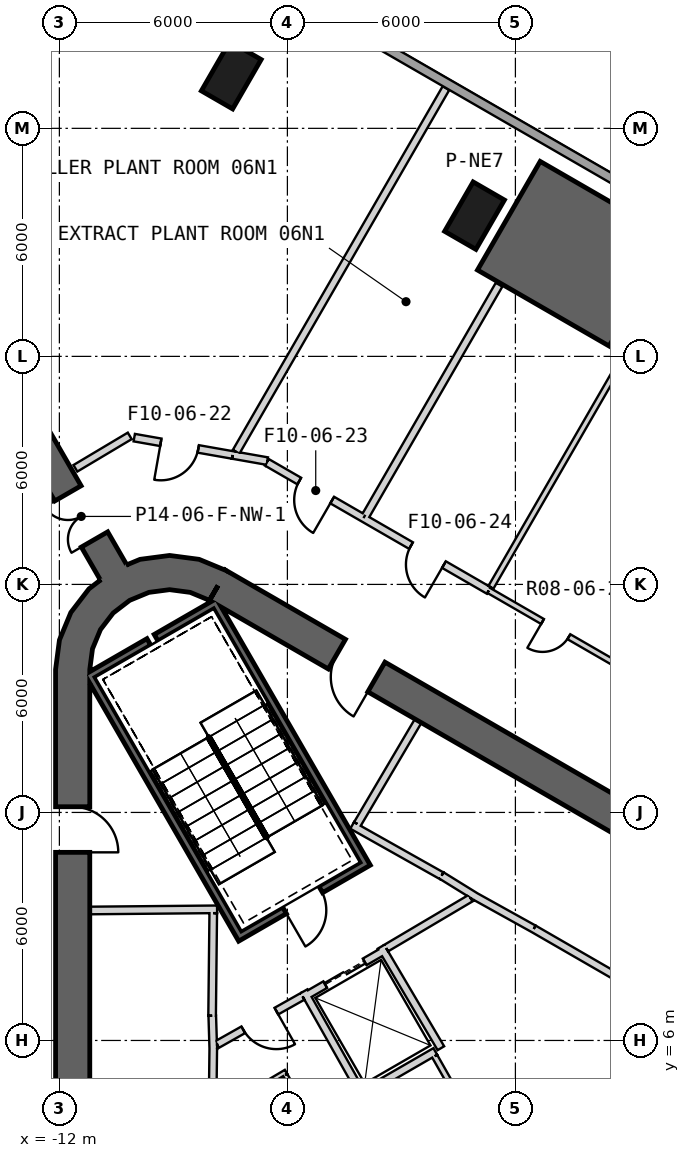
"""IFC4 building model, lengths in metres.
Left out: names, types, materials, properties, quantities, classifications, styles, units other than length and angle.
Written with IfcOpenShell. Run it as: python <this file> out.ifc"""

import sys

from ifc_helpers import new_model, si_unit, direction, frame, frame_2d, origin, origin_2d, place, context, subcontext, project, spatial, polyline, rectangle, outline, extrude, element, fill, save


model = new_model("IFC4")
c1 = context("Model", 3, precision=1e-05, world=origin(), true_north=direction((0.0, 1.0)))
c2 = subcontext(c1, "Body", "Model", "MODEL_VIEW")
j1 = project(units=[si_unit("LENGTHUNIT", "METRE"), si_unit("PLANEANGLEUNIT", "RADIAN")], contexts=[c1])
p1 = place(None, origin())
s1 = spatial("IfcSite", under=j1, at=p1, CompositionType="ELEMENT")
p2 = place(p1, origin())
s2 = spatial("IfcBuilding", under=s1, at=p2, CompositionType="ELEMENT")
p3 = place(p2, frame((0.0, 0.0, 39.5)))
s3 = spatial("IfcBuildingStorey", under=s2, at=p3, CompositionType="ELEMENT", Elevation=39.5)
for number, where, z_axis, x_axis in (
    (1, (-1.076, 27.703, 0.0), (0.0, 0.0, 1.0), (0.5, 0.866, 0.0)),
    (2, (-7.477, 31.398, 0.0), (0.0, 0.0, 1.0), (0.5, 0.866, 0.0)),
):
    element("IfcColumn", number, at=place(p3, frame(where, z_axis=z_axis, x_axis=x_axis)), inside=s3, PredefinedType="COLUMN", context=c2, shape_type="SweptSolid", body=[
        extrude(rectangle(XDim=1.5, YDim=0.95, at=origin_2d()), origin(), (0.0, 0.0, 1.0), 5.7),
    ])
p4 = place(p3, frame((19.475, 2.208, 0.0), z_axis=(0.0, 0.0, 1.0), x_axis=(-0.866028369851, 0.499994862586, 0.0)))
e3 = element("IfcWall", 3, at=p4, inside=s3, PredefinedType="SHEAR", context=c2, shape_type="SweptSolid", body=[
    extrude(rectangle(XDim=31.523, YDim=0.9, at=frame_2d((15.762, 0.0))), origin(), (0.0, 0.0, 1.0), 6.0),
])
p5 = place(p4, frame((3.612, 0.0, 0.0)))
e4 = element("IfcOpeningElement", 4, at=p5, cuts=e3, PredefinedType="OPENING", context=c2, shape_type="SweptSolid", body=[
    extrude(rectangle(XDim=1.2, YDim=2.4, at=frame_2d((0.6, 1.2))), frame((0.0, 0.46, 0.0), z_axis=(0.0, -1.0, 0.0), x_axis=(1.0, 0.0, 0.0)), (0.0, 0.0, 1.0), 0.92),
])
p6 = place(p4, frame((26.712, 0.0, 0.0)))
e5 = element("IfcOpeningElement", 5, at=p6, cuts=e3, PredefinedType="OPENING", context=c2, shape_type="SweptSolid", body=[
    extrude(rectangle(XDim=1.2, YDim=2.4, at=frame_2d((0.6, 1.2))), frame((0.0, 0.46, 0.0), z_axis=(0.0, -1.0, 0.0), x_axis=(1.0, 0.0, 0.0)), (0.0, 0.0, 1.0), 0.92),
])
p7 = place(p3, frame((-11.65, 15.762, 0.0), z_axis=(0.0, 0.0, 1.0), x_axis=(0.0, -1.0, 0.0)))
e6 = element("IfcWall", 6, at=p7, inside=s3, PredefinedType="SHEAR", context=c2, shape_type="SweptSolid", body=[
    extrude(rectangle(XDim=31.523, YDim=0.9, at=frame_2d((15.762, 0.0))), origin(), (0.0, 0.0, 1.0), 6.0),
])
p8 = place(p7, frame((3.612, 0.0, 0.0)))
e7 = element("IfcOpeningElement", 7, at=p8, cuts=e6, PredefinedType="OPENING", context=c2, shape_type="SweptSolid", body=[
    extrude(rectangle(XDim=1.2, YDim=2.4, at=frame_2d((0.6, 1.2))), frame((0.0, 0.46, 0.0), z_axis=(0.0, -1.0, 0.0), x_axis=(1.0, 0.0, 0.0)), (0.0, 0.0, 1.0), 0.92),
])
p9 = place(p7, frame((26.712, 0.0, 0.0)))
e8 = element("IfcOpeningElement", 8, at=p9, cuts=e6, PredefinedType="OPENING", context=c2, shape_type="SweptSolid", body=[
    extrude(rectangle(XDim=1.2, YDim=2.4, at=frame_2d((0.6, 1.2))), frame((0.0, 0.46, 0.0), z_axis=(0.0, -1.0, 0.0), x_axis=(1.0, 0.0, 0.0)), (0.0, 0.0, 1.0), 0.92),
])
p10 = place(p3, origin())
e9 = element("IfcWall", 9, at=p10, inside=s3, PredefinedType="SHEAR", context=c2, shape_type="SweptSolid", body=[
    extrude(outline(polyline([(-7.6, 18.36), (-8.323, 18.659), (-9.1, 18.762), (-9.876, 18.659), (-10.6, 18.36), (-11.221, 17.883), (-11.698, 17.262), (-11.998, 16.538), (-12.1, 15.762), (-11.2, 15.762), (-11.128, 16.305), (-10.919, 16.812), (-10.585, 17.247), (-10.15, 17.58), (-9.644, 17.79), (-9.1, 17.862), (-8.556, 17.79), (-8.05, 17.58), (-7.6, 18.36)])), origin(), (0.0, 0.0, 1.0), 6.0),
])
p11 = place(p3, frame((-10.575, 18.316, 0.0), z_axis=(0.0, 0.0, 1.0), x_axis=(-0.499996575515, 0.866027380903, 0.0)))
e10 = element("IfcWall", 10, at=p11, inside=s3, PredefinedType="SHEAR", context=c2, shape_type="SweptSolid", body=[
    extrude(rectangle(XDim=13.954, YDim=0.8, at=frame_2d((6.977, 0.0))), origin(), (0.0, 0.0, 1.0), 6.0),
])
p12 = place(p11, frame((1.0, 0.0, 0.0)))
e11 = element("IfcOpeningElement", 11, at=p12, cuts=e10, PredefinedType="OPENING", context=c2, shape_type="SweptSolid", body=[
    extrude(rectangle(XDim=1.4, YDim=2.4, at=frame_2d((0.7, 1.2))), frame((0.0, 0.41, 0.0), z_axis=(0.0, -1.0, 0.0), x_axis=(1.0, 0.0, 0.0)), (0.0, 0.0, 1.0), 0.82),
])
p13 = place(p3, origin())
e12 = element("IfcWall", 12, at=p13, inside=s3, PredefinedType="SHEAR", context=c2, shape_type="SweptSolid", body=[
    extrude(outline(polyline([(4.116, 27.13), (0.652, 29.13), (-0.998, 26.272), (2.467, 24.272), (4.116, 27.13)])), origin(), (0.0, 0.0, 1.0), 5.7),
])
p14 = place(p3, frame((30.969, 12.269, 0.0), z_axis=(0.0, 0.0, 1.0), x_axis=(-0.866060590604, 0.499939049688, 0.0)))
e13 = element("IfcWall", 13, at=p14, inside=s3, PredefinedType="SOLIDWALL", context=c2, shape_type="SweptSolid", body=[
    extrude(rectangle(XDim=41.371, YDim=0.24, at=frame_2d((20.686, 0.0))), origin(), (0.0, 0.0, 1.0), 5.7),
])
p15 = place(p3, frame((-11.2, 9.42, 0.0), z_axis=(0.0, 0.0, 1.0), x_axis=(0.999957167047, 0.009255488683, 0.0)))
e14 = element("IfcWall", 14, at=p15, inside=s3, PredefinedType="PLUMBINGWALL", context=c2, shape_type="SweptSolid", body=[
    extrude(rectangle(XDim=3.35, YDim=0.2, at=frame_2d((1.675, 0.0))), origin(), (0.0, 0.0, 1.0), 5.7),
])
p16 = place(p3, frame((-7.951, 9.35, 0.0), z_axis=(0.0, 0.0, 1.0), x_axis=(-0.011120469654, -0.999938165666, 0.0)))
e15 = element("IfcWall", 15, at=p16, inside=s3, PredefinedType="PLUMBINGWALL", context=c2, shape_type="SweptSolid", body=[
    extrude(rectangle(XDim=2.7, YDim=0.2, at=frame_2d((1.35, 0.0))), origin(), (0.0, 0.0, 1.0), 5.7),
])
p17 = place(p3, frame((7.497, 4.886, 0.0), z_axis=(0.0, 0.0, 1.0), x_axis=(-0.866030989016, 0.499990325971, 0.0)))
e16 = element("IfcWall", 16, at=p17, inside=s3, PredefinedType="PLUMBINGWALL", context=c2, shape_type="SweptSolid", body=[
    extrude(rectangle(XDim=8.1, YDim=0.2, at=frame_2d((4.05, 0.0))), origin(), (0.0, 0.0, 1.0), 5.7),
])
p18 = place(p3, frame((-7.977, 6.65, 0.0), z_axis=(0.0, 0.0, 1.0), x_axis=(0.030861509705, -0.999523670164, 0.0)))
e17 = element("IfcWall", 17, at=p18, inside=s3, PredefinedType="PLUMBINGWALL", context=c2, shape_type="SweptSolid", body=[
    extrude(rectangle(XDim=0.878, YDim=0.2, at=frame_2d((0.439, 0.0))), origin(), (0.0, 0.0, 1.0), 5.7),
])
p19 = place(p3, frame((-7.949, 5.895, 0.0), z_axis=(0.0, 0.0, 1.0), x_axis=(-0.012042535896, -0.999927486035, 0.0)))
e18 = element("IfcWall", 18, at=p19, inside=s3, PredefinedType="PLUMBINGWALL", context=c2, shape_type="SweptSolid", body=[
    extrude(rectangle(XDim=1.845, YDim=0.2, at=frame_2d((0.922, 0.0))), origin(), (0.0, 0.0, 1.0), 5.7),
])
p20 = place(p3, frame((-1.941, 10.339, 0.0), z_axis=(0.0, 0.0, 1.0), x_axis=(0.850216889117, -0.526432561171, 0.0)))
e19 = element("IfcWall", 19, at=p20, inside=s3, PredefinedType="PLUMBINGWALL", context=c2, shape_type="SweptSolid", body=[
    extrude(rectangle(XDim=1.078, YDim=0.2, at=frame_2d((0.539, 0.0))), origin(), (0.0, 0.0, 1.0), 5.7),
])
p21 = place(p3, frame((0.483, 8.936, 0.0), z_axis=(0.0, 0.0, 1.0), x_axis=(-0.874269620932, 0.485440655401, 0.0)))
e20 = element("IfcWall", 20, at=p21, inside=s3, PredefinedType="PLUMBINGWALL", context=c2, shape_type="SweptSolid", body=[
    extrude(rectangle(XDim=1.845, YDim=0.2, at=frame_2d((0.922, 0.0))), origin(), (0.0, 0.0, 1.0), 5.7),
])
p22 = place(p3, frame((-4.296, 11.659, 0.0), z_axis=(0.0, 0.0, 1.0), x_axis=(0.871534483978, -0.490334215854, 0.0)))
e21 = element("IfcWall", 21, at=p22, inside=s3, PredefinedType="PLUMBINGWALL", context=c2, shape_type="SweptSolid", body=[
    extrude(rectangle(XDim=2.7, YDim=0.2, at=frame_2d((1.35, 0.0))), origin(), (0.0, 0.0, 1.0), 5.7),
])
p23 = place(p3, frame((-4.158, 11.696, 0.0), z_axis=(0.0, 0.0, 1.0), x_axis=(0.508018930956, 0.861345903683, 0.0)))
e22 = element("IfcWall", 22, at=p23, inside=s3, PredefinedType="PLUMBINGWALL", context=c2, shape_type="SweptSolid", body=[
    extrude(rectangle(XDim=3.15, YDim=0.2, at=frame_2d((1.575, 0.0))), origin(), (0.0, 0.0, 1.0), 5.7),
])
p24 = place(p3, frame((-11.245, 15.678, -0.35), z_axis=(0.0, 0.0, 1.0), x_axis=(0.499977274689, -0.866038523851, 0.0)))
e23 = element("IfcWall", 23, at=p24, inside=s3, PredefinedType="SHEAR", context=c2, shape_type="SweptSolid", body=[
    extrude(rectangle(XDim=8.1, YDim=0.2, at=frame_2d((4.05, 0.0))), origin(), (0.0, 0.0, 1.0), 6.05),
])
p25 = place(p3, frame((-7.818, 17.541, -0.35), z_axis=(0.0, 0.0, 1.0), x_axis=(-0.866088799389, -0.499890179513, 0.0)))
e24 = element("IfcWall", 24, at=p25, inside=s3, PredefinedType="SHEAR", context=c2, shape_type="SweptSolid", body=[
    extrude(rectangle(XDim=1.89, YDim=0.2, at=frame_2d((0.945, 0.0))), origin(), (0.0, 0.0, 1.0), 6.05),
])
p26 = place(p3, frame((-9.645, 16.486, -0.35), z_axis=(0.0, 0.0, 1.0), x_axis=(-0.866038843867, -0.499976720371, 0.0)))
e25 = element("IfcWall", 25, at=p26, inside=s3, PredefinedType="SHEAR", context=c2, shape_type="SweptSolid", body=[
    extrude(rectangle(XDim=1.69, YDim=0.2, at=frame_2d((0.845, 0.0))), origin(), (0.0, 0.0, 1.0), 6.05),
])
p27 = place(p3, frame((-7.854, 17.405, -0.35), z_axis=(0.0, 0.0, 1.0), x_axis=(0.499997992926, -0.866026562566, 0.0)))
e26 = element("IfcWall", 26, at=p27, inside=s3, PredefinedType="SHEAR", context=c2, shape_type="SweptSolid", body=[
    extrude(rectangle(XDim=7.9, YDim=0.2, at=frame_2d((3.95, 0.0))), origin(), (0.0, 0.0, 1.0), 6.05),
])
p28 = place(p3, frame((-7.159, 8.8, -0.35), z_axis=(0.0, 0.0, 1.0), x_axis=(0.866047807691, 0.499961193289, 0.0)))
e27 = element("IfcWall", 27, at=p28, inside=s3, PredefinedType="SHEAR", context=c2, shape_type="SweptSolid", body=[
    extrude(rectangle(XDim=3.6, YDim=0.2, at=frame_2d((1.8, 0.0))), origin(), (0.0, 0.0, 1.0), 6.05),
])
p29 = place(p28, frame((1.25, 0.0, 0.35)))
e28 = element("IfcOpeningElement", 28, at=p29, cuts=e27, PredefinedType="OPENING", context=c2, shape_type="SweptSolid", body=[
    extrude(rectangle(XDim=1.1, YDim=2.1, at=frame_2d((0.55, 1.05))), frame((0.0, 0.11, 0.0), z_axis=(0.0, -1.0, 0.0), x_axis=(1.0, 0.0, 0.0)), (0.0, 0.0, 1.0), 0.22),
])
p30 = place(p3, frame((-5.524, 7.168, 0.0), z_axis=(0.0, 0.0, 1.0), x_axis=(0.866024647952, 0.500001309137, 0.0)))
e29 = element("IfcWall", 29, at=p30, inside=s3, PredefinedType="PLUMBINGWALL", context=c2, shape_type="SweptSolid", body=[
    extrude(rectangle(XDim=2.4, YDim=0.2, at=frame_2d((1.2, 0.0))), origin(), (0.0, 0.0, 1.0), 5.7),
])
p31 = place(p30, frame((0.6, 0.0, 0.0)))
e30 = element("IfcOpeningElement", 30, at=p31, cuts=e29, PredefinedType="OPENING", context=c2, shape_type="SweptSolid", body=[
    extrude(rectangle(XDim=1.2, YDim=2.4, at=frame_2d((0.6, 1.2))), frame((0.0, 0.11, 0.0), z_axis=(0.0, -1.0, 0.0), x_axis=(1.0, 0.0, 0.0)), (0.0, 0.0, 1.0), 0.22),
])
p32 = place(p3, frame((-3.538, 8.465, 0.0), z_axis=(0.0, 0.0, 1.0), x_axis=(0.508647062354, -0.860975125052, 0.0)))
e31 = element("IfcWall", 31, at=p32, inside=s3, PredefinedType="PLUMBINGWALL", context=c2, shape_type="SweptSolid", body=[
    extrude(rectangle(XDim=3.1, YDim=0.2, at=frame_2d((1.55, 0.0))), origin(), (0.0, 0.0, 1.0), 5.7),
])
p33 = place(p3, frame((-2.108, 5.711, 0.0), z_axis=(0.0, 0.0, 1.0), x_axis=(-0.866009305107, -0.50002788269, 0.0)))
e32 = element("IfcWall", 32, at=p33, inside=s3, PredefinedType="PLUMBINGWALL", context=c2, shape_type="SweptSolid", body=[
    extrude(rectangle(XDim=2.329, YDim=0.2, at=frame_2d((1.165, 0.0))), origin(), (0.0, 0.0, 1.0), 5.7),
])
p34 = place(p3, frame((-5.562, 7.296, 0.0), z_axis=(0.0, 0.0, 1.0), x_axis=(0.49134651263, -0.870964180966, 0.0)))
e33 = element("IfcWall", 33, at=p34, inside=s3, PredefinedType="PLUMBINGWALL", context=c2, shape_type="SweptSolid", body=[
    extrude(rectangle(XDim=3.0, YDim=0.2, at=frame_2d((1.5, 0.0))), origin(), (0.0, 0.0, 1.0), 5.7),
])
p35 = place(p3, frame((-1.18, 9.744, 0.0), z_axis=(0.0, 0.0, 1.0), x_axis=(-0.860615607571, -0.509255118781, 0.0)))
e34 = element("IfcWall", 34, at=p35, inside=s3, PredefinedType="PARTITIONING", context=c2, shape_type="SweptSolid", body=[
    extrude(rectangle(XDim=2.581, YDim=0.2, at=frame_2d((1.29, 0.0))), origin(), (0.0, 0.0, 1.0), 5.7),
])
p36 = place(p3, frame((-5.6, 7.16, 0.0), z_axis=(0.0, 0.0, 1.0), x_axis=(-0.871363259478, -0.490638431059, 0.0)))
e35 = element("IfcWall", 35, at=p36, inside=s3, PredefinedType="PARTITIONING", context=c2, shape_type="SweptSolid", body=[
    extrude(rectangle(XDim=2.581, YDim=0.2, at=frame_2d((1.291, 0.0))), origin(), (0.0, 0.0, 1.0), 5.7),
])
p37 = place(p36, frame((0.791, 0.0, 0.0)))
e36 = element("IfcOpeningElement", 36, at=p37, cuts=e35, PredefinedType="OPENING", context=c2, shape_type="SweptSolid", body=[
    extrude(rectangle(XDim=1.0, YDim=2.1, at=frame_2d((0.5, 1.05))), frame((0.0, 0.11, 0.0), z_axis=(0.0, -1.0, 0.0), x_axis=(1.0, 0.0, 0.0)), (0.0, 0.0, 1.0), 0.22),
])
p38 = place(p3, frame((-2.124, 5.586, 0.0), z_axis=(0.0, 0.0, 1.0), x_axis=(0.494084527552, -0.869413871314, 0.0)))
e37 = element("IfcWall", 37, at=p38, inside=s3, PredefinedType="PLUMBINGWALL", context=c2, shape_type="SweptSolid", body=[
    extrude(rectangle(XDim=4.188, YDim=0.15, at=frame_2d((2.094, 0.0))), origin(), (0.0, 0.0, 1.0), 5.7),
])
p39 = place(p3, frame((-6.037, 5.176, 0.0), z_axis=(0.0, 0.0, 1.0), x_axis=(-0.860106072674, -0.510115225953, 0.0)))
e38 = element("IfcWall", 38, at=p39, inside=s3, PredefinedType="PARTITIONING", context=c2, shape_type="SweptSolid", body=[
    extrude(rectangle(XDim=2.225, YDim=0.12, at=frame_2d((1.112, 0.0))), origin(), (0.0, 0.0, 1.0), 5.7),
])
p40 = place(p3, frame((-4.558, 2.495, 0.0), z_axis=(0.0, 0.0, 1.0), x_axis=(-0.499990139034, 0.866031096941, 0.0)))
e39 = element("IfcWall", 39, at=p40, inside=s3, PredefinedType="PARTITIONING", context=c2, shape_type="SweptSolid", body=[
    extrude(rectangle(XDim=3.0, YDim=0.12, at=frame_2d((1.5, 0.0))), origin(), (0.0, 0.0, 1.0), 5.7),
])
p41 = place(p40, frame((1.13, 0.0, 0.0)))
e40 = element("IfcOpeningElement", 40, at=p41, cuts=e39, PredefinedType="OPENING", context=c2, shape_type="SweptSolid", body=[
    extrude(rectangle(XDim=0.8, YDim=2.1, at=frame_2d((0.4, 1.05))), frame((0.0, 0.07, 0.0), z_axis=(0.0, -1.0, 0.0), x_axis=(1.0, 0.0, 0.0)), (0.0, 0.0, 1.0), 0.14),
])
p42 = place(p3, frame((-10.148, 21.908, 0.0), z_axis=(0.0, 0.0, 1.0), x_axis=(-0.858835346978, -0.512251741608, 0.0)))
e41 = element("IfcWall", 41, at=p42, inside=s3, PredefinedType="PARTITIONING", context=c2, shape_type="SweptSolid", body=[
    extrude(rectangle(XDim=1.665, YDim=0.2, at=frame_2d((0.833, 0.0))), origin(), (0.0, 0.0, 1.0), 5.7),
])
p43 = place(p3, frame((-6.528, 21.245, 0.0), z_axis=(0.0, 0.0, 1.0), x_axis=(-0.984820658636, 0.173574970324, 0.0)))
e42 = element("IfcWall", 42, at=p43, inside=s3, PredefinedType="PARTITIONING", context=c2, shape_type="SweptSolid", body=[
    extrude(rectangle(XDim=0.927, YDim=0.2, at=frame_2d((0.463, 0.0))), origin(), (0.0, 0.0, 1.0), 5.7),
])
p44 = place(p3, frame((-7.441, 21.406, 0.0), z_axis=(0.0, 0.0, 1.0), x_axis=(-0.984798516993, 0.173700549592, 0.0)))
e43 = element("IfcWall", 43, at=p44, inside=s3, PredefinedType="PARTITIONING", context=c2, shape_type="SweptSolid", body=[
    extrude(rectangle(XDim=2.628, YDim=0.2, at=frame_2d((1.314, 0.0))), origin(), (0.0, 0.0, 1.0), 4.78),
])
p45 = place(p44, frame((0.919, 0.0, 0.0)))
e44 = element("IfcOpeningElement", 44, at=p45, cuts=e43, PredefinedType="OPENING", context=c2, shape_type="SweptSolid", body=[
    extrude(rectangle(XDim=1.0, YDim=2.1, at=frame_2d((0.5, 1.05))), frame((0.0, 0.11, 0.0), z_axis=(0.0, -1.0, 0.0), x_axis=(1.0, 0.0, 0.0)), (0.0, 0.0, 1.0), 0.22),
])
p46 = place(p3, frame((-0.7, 17.84, 0.0), z_axis=(0.0, 0.0, 1.0), x_axis=(-0.866009436129, 0.500027655771, 0.0)))
e45 = element("IfcWall", 45, at=p46, inside=s3, PredefinedType="PARTITIONING", context=c2, shape_type="SweptSolid", body=[
    extrude(rectangle(XDim=3.808, YDim=0.2, at=frame_2d((1.904, 0.0))), origin(), (0.0, 0.0, 1.0), 4.88),
])
p47 = place(p46, frame((1.363, 0.0, 0.0)))
e46 = element("IfcOpeningElement", 46, at=p47, cuts=e45, PredefinedType="OPENING", context=c2, shape_type="SweptSolid", body=[
    extrude(rectangle(XDim=1.0, YDim=2.1, at=frame_2d((0.5, 1.05))), frame((0.0, 0.11, 0.0), z_axis=(0.0, -1.0, 0.0), x_axis=(1.0, 0.0, 0.0)), (0.0, 0.0, 1.0), 0.22),
])
p48 = place(p3, frame((-3.999, 19.745, 0.0), z_axis=(0.0, 0.0, 1.0), x_axis=(-0.866053990355, 0.499950483338, 0.0)))
e47 = element("IfcWall", 47, at=p48, inside=s3, PredefinedType="PARTITIONING", context=c2, shape_type="SweptSolid", body=[
    extrude(rectangle(XDim=2.935, YDim=0.2, at=frame_2d((1.467, 0.0))), origin(), (0.0, 0.0, 1.0), 4.88),
])
p49 = place(p48, frame((0.95, 0.0, 0.0)))
e48 = element("IfcOpeningElement", 48, at=p49, cuts=e47, PredefinedType="OPENING", context=c2, shape_type="SweptSolid", body=[
    extrude(rectangle(XDim=1.0, YDim=2.1, at=frame_2d((0.5, 1.05))), frame((0.0, 0.11, 0.0), z_axis=(0.0, -1.0, 0.0), x_axis=(1.0, 0.0, 0.0)), (0.0, 0.0, 1.0), 0.22),
])
p50 = place(p3, frame((2.587, 15.943, 0.0), z_axis=(0.0, 0.0, 1.0), x_axis=(-0.866037770685, 0.499978579288, 0.0)))
e49 = element("IfcWall", 49, at=p50, inside=s3, PredefinedType="PLUMBINGWALL", context=c2, shape_type="SweptSolid", body=[
    extrude(rectangle(XDim=3.796, YDim=0.15, at=frame_2d((1.898, 0.0))), origin(), (0.0, 0.0, 1.0), 4.88),
])
p51 = place(p50, frame((1.363, 0.0, 0.0)))
e50 = element("IfcOpeningElement", 50, at=p51, cuts=e49, PredefinedType="OPENING", context=c2, shape_type="SweptSolid", body=[
    extrude(rectangle(XDim=0.8, YDim=2.1, at=frame_2d((0.4, 1.05))), frame((0.0, 0.085, 0.0), z_axis=(0.0, -1.0, 0.0), x_axis=(1.0, 0.0, 0.0)), (0.0, 0.0, 1.0), 0.17),
])
p52 = place(p3, frame((-7.348, 21.491, 0.0), z_axis=(0.0, 0.0, 1.0), x_axis=(0.499855125304, 0.866109031074, 0.0)))
e51 = element("IfcWall", 51, at=p52, inside=s3, PredefinedType="PARTITIONING", context=c2, shape_type="SweptSolid", body=[
    extrude(rectangle(XDim=11.045, YDim=0.2, at=frame_2d((5.522, 0.0))), origin(), (0.0, 0.0, 1.0), 4.88),
])
p53 = place(p3, frame((-3.931, 19.821, 0.0), z_axis=(0.0, 0.0, 1.0), x_axis=(0.499997052475, 0.866027105532, 0.0)))
e52 = element("IfcWall", 52, at=p53, inside=s3, PredefinedType="PARTITIONING", context=c2, shape_type="SweptSolid", body=[
    extrude(rectangle(XDim=7.003, YDim=0.2, at=frame_2d((3.502, 0.0))), origin(), (0.0, 0.0, 1.0), 4.88),
])
p54 = place(p3, frame((-0.644, 17.923, 0.0), z_axis=(0.0, 0.0, 1.0), x_axis=(0.500017264306, 0.866015436003, 0.0)))
e53 = element("IfcWall", 53, at=p54, inside=s3, PredefinedType="PLUMBINGWALL", context=c2, shape_type="SweptSolid", body=[
    extrude(rectangle(XDim=6.953, YDim=0.15, at=frame_2d((3.477, 0.0))), origin(), (0.0, 0.0, 1.0), 4.88),
])
p55 = place(p29, origin())
e54 = element("IfcDoor", 54, at=p55, inside=s3, OperationType="SINGLE_SWING_LEFT", PredefinedType="USERDEFINED", context=c2, shape_type="SweptSolid", body=[
    extrude(rectangle(XDim=1.1, YDim=2.1, at=frame_2d((0.55, 1.05))), frame((0.0, 0.025, 0.0), z_axis=(0.0, -1.0, 0.0), x_axis=(1.0, 0.0, 0.0)), (0.0, 0.0, 1.0), 0.05),
])
fill(e28, e54)
p56 = place(p37, origin())
e55 = element("IfcDoor", 55, at=p56, inside=s3, OperationType="SINGLE_SWING_LEFT", PredefinedType="USERDEFINED", context=c2, shape_type="SweptSolid", body=[
    extrude(rectangle(XDim=1.0, YDim=2.1, at=frame_2d((0.5, 1.05))), frame((0.0, 0.025, 0.0), z_axis=(0.0, -1.0, 0.0), x_axis=(1.0, 0.0, 0.0)), (0.0, 0.0, 1.0), 0.05),
])
fill(e36, e55)
p57 = place(p31, origin())
e56 = element("IfcDoor", 56, at=p57, inside=s3, OperationType="SLIDING_TO_LEFT", PredefinedType="USERDEFINED", context=c2, shape_type="SweptSolid", body=[
    extrude(rectangle(XDim=1.2, YDim=2.4, at=frame_2d((0.6, 1.2))), frame((0.0, 0.025, 0.0), z_axis=(0.0, -1.0, 0.0), x_axis=(1.0, 0.0, 0.0)), (0.0, 0.0, 1.0), 0.05),
])
fill(e30, e56)
p58 = place(p45, origin())
e57 = element("IfcDoor", 57, at=p58, inside=s3, OperationType="SINGLE_SWING_RIGHT", PredefinedType="USERDEFINED", context=c2, shape_type="SweptSolid", body=[
    extrude(rectangle(XDim=1.0, YDim=2.1, at=frame_2d((0.5, 1.05))), frame((0.0, 0.025, 0.0), z_axis=(0.0, -1.0, 0.0), x_axis=(1.0, 0.0, 0.0)), (0.0, 0.0, 1.0), 0.05),
])
fill(e44, e57)
p59 = place(p49, origin())
e58 = element("IfcDoor", 58, at=p59, inside=s3, OperationType="SINGLE_SWING_LEFT", PredefinedType="USERDEFINED", context=c2, shape_type="SweptSolid", body=[
    extrude(rectangle(XDim=1.0, YDim=2.1, at=frame_2d((0.5, 1.05))), frame((0.0, 0.025, 0.0), z_axis=(0.0, -1.0, 0.0), x_axis=(1.0, 0.0, 0.0)), (0.0, 0.0, 1.0), 0.05),
])
fill(e48, e58)
p60 = place(p47, origin())
e59 = element("IfcDoor", 59, at=p60, inside=s3, OperationType="SINGLE_SWING_LEFT", PredefinedType="USERDEFINED", context=c2, shape_type="SweptSolid", body=[
    extrude(rectangle(XDim=1.0, YDim=2.1, at=frame_2d((0.5, 1.05))), frame((0.0, 0.025, 0.0), z_axis=(0.0, -1.0, 0.0), x_axis=(1.0, 0.0, 0.0)), (0.0, 0.0, 1.0), 0.05),
])
fill(e46, e59)
p61 = place(p51, origin())
e60 = element("IfcDoor", 60, at=p61, inside=s3, OperationType="SINGLE_SWING_RIGHT", PredefinedType="USERDEFINED", context=c2, shape_type="SweptSolid", body=[
    extrude(rectangle(XDim=0.8, YDim=2.1, at=frame_2d((0.4, 1.05))), frame((0.0, 0.025, 0.0), z_axis=(0.0, -1.0, 0.0), x_axis=(1.0, 0.0, 0.0)), (0.0, 0.0, 1.0), 0.05),
])
fill(e50, e60)
p62 = place(p6, origin())
e61 = element("IfcDoor", 61, at=p62, inside=s3, OperationType="SINGLE_SWING_LEFT", PredefinedType="USERDEFINED", context=c2, shape_type="SweptSolid", body=[
    extrude(rectangle(XDim=1.2, YDim=2.4, at=frame_2d((0.6, 1.2))), frame((0.0, 0.025, 0.0), z_axis=(0.0, -1.0, 0.0), x_axis=(1.0, 0.0, 0.0)), (0.0, 0.0, 1.0), 0.05),
])
fill(e5, e61)
p63 = place(p8, origin())
e62 = element("IfcDoor", 62, at=p63, inside=s3, OperationType="SINGLE_SWING_RIGHT", PredefinedType="USERDEFINED", context=c2, shape_type="SweptSolid", body=[
    extrude(rectangle(XDim=1.2, YDim=2.4, at=frame_2d((0.6, 1.2))), frame((0.0, 0.025, 0.0), z_axis=(0.0, -1.0, 0.0), x_axis=(1.0, 0.0, 0.0)), (0.0, 0.0, 1.0), 0.05),
])
fill(e7, e62)
p64 = place(p12, origin())
e63 = element("IfcDoor", 63, at=p64, inside=s3, OperationType="DOUBLE_DOOR_SINGLE_SWING", PredefinedType="NOTDEFINED", context=c2, shape_type="SweptSolid", body=[
    extrude(rectangle(XDim=1.4, YDim=2.4, at=frame_2d((0.7, 1.2))), frame((0.0, 0.025, 0.0), z_axis=(0.0, -1.0, 0.0), x_axis=(1.0, 0.0, 0.0)), (0.0, 0.0, 1.0), 0.05),
])
fill(e11, e63)
save(model, sys.argv[1])
